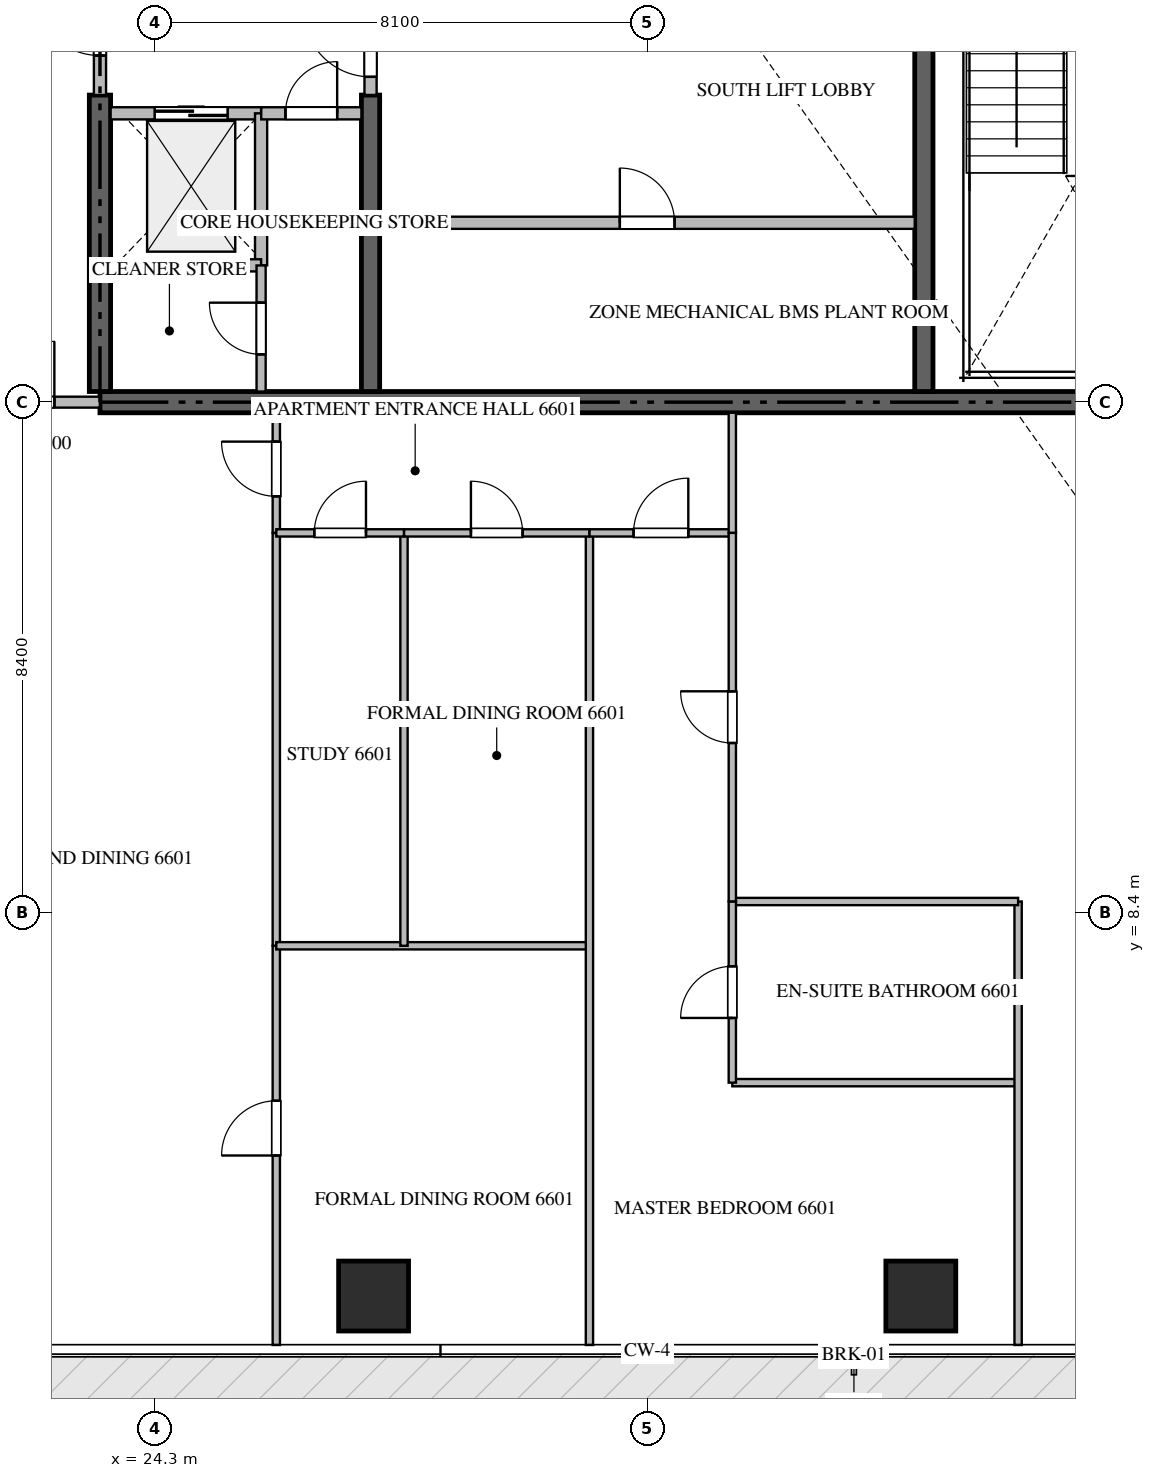
"""IFC4 building model, lengths in metres.
Left out: names, types, materials, properties, quantities, classifications, styles, units other than length and angle.
Written with IfcOpenShell. Run it as: python <this file> out.ifc"""

import sys

from ifc_helpers import new_model, si_unit, direction, frame, frame_2d, origin, origin_2d, place, context, subcontext, project, spatial, rectangle, extrude, source, transform, mapped, element, fill, save


model = new_model("IFC4")
c1 = context("Model", 3, precision=1e-05, world=origin(), true_north=direction((0.0, 1.0)))
c2 = subcontext(c1, "Body", "Model", "MODEL_VIEW")
j1 = project(units=[si_unit("LENGTHUNIT", "METRE"), si_unit("PLANEANGLEUNIT", "RADIAN")], contexts=[c1])
p1 = place(None, origin())
s1 = spatial("IfcSite", under=j1, at=p1, CompositionType="ELEMENT")
p2 = place(p1, origin())
s2 = spatial("IfcBuilding", under=s1, at=p2, CompositionType="ELEMENT")
p3 = place(p2, frame((0.0, 0.0, 264.35)))
s3 = spatial("IfcBuildingStorey", under=s2, at=p3, CompositionType="ELEMENT", Elevation=264.35)
p4 = place(p3, frame((23.4, 16.8, -0.26), z_axis=(0.0, 0.0, 1.0), x_axis=(1.0, 0.0, 0.0)))
e1 = element("IfcWall", 1, at=p4, inside=s3, PredefinedType="SHEAR", context=c2, shape_type="SweptSolid", body=[
    extrude(rectangle(XDim=18.0, YDim=0.35, at=frame_2d((9.0, 0.0))), origin(), (0.0, 0.0, 1.0), 3.848),
])
p5 = place(p3, frame((23.4, 16.975, -0.26), z_axis=(0.0, 0.0, 1.0), x_axis=(0.0, 1.0, 0.0)))
e2 = element("IfcWall", 2, at=p5, inside=s3, PredefinedType="SHEAR", context=c2, shape_type="SweptSolid", body=[
    extrude(rectangle(XDim=4.875, YDim=0.35, at=frame_2d((2.438, 0.0))), origin(), (0.0, 0.0, 1.0), 3.848),
])
p6 = place(p3, frame((27.85, 16.975, -0.26), z_axis=(0.0, 0.0, 1.0), x_axis=(0.0, 1.0, 0.0)))
e3 = element("IfcWall", 3, at=p6, inside=s3, PredefinedType="SHEAR", context=c2, shape_type="SweptSolid", body=[
    extrude(rectangle(XDim=4.875, YDim=0.3, at=frame_2d((2.438, 0.0))), origin(), (0.0, 0.0, 1.0), 3.848),
])
p7 = place(p3, frame((36.95, 16.975, -0.26), z_axis=(0.0, 0.0, 1.0), x_axis=(0.0, 1.0, 0.0)))
e4 = element("IfcWall", 4, at=p7, inside=s3, PredefinedType="SHEAR", context=c2, shape_type="SweptSolid", body=[
    extrude(rectangle(XDim=8.375, YDim=0.3, at=frame_2d((4.188, 0.0))), origin(), (0.0, 0.0, 1.0), 3.848),
])
m1 = source(origin(), c2, "Body", "SweptSolid", [
    extrude(rectangle(XDim=1.15, YDim=1.15, at=origin_2d()), origin(), (0.0, 0.0, 1.0), 3.85),
])
for number, where, z_axis, x_axis in (
    (5, (27.9, 2.1, -0.26), (0.0, 0.0, 1.0), (1.0, 0.0, 0.0)),
    (6, (36.9, 2.1, -0.26), (0.0, 0.0, 1.0), (1.0, 0.0, 0.0)),
):
    element("IfcColumn", number, at=place(p3, frame(where, z_axis=z_axis, x_axis=x_axis)), inside=s3, PredefinedType="COLUMN", context=c2, shape_type="MappedRepresentation", body=[
        mapped(m1, transform((0.0, 0.0, 0.0), scale=1.0)),
    ])
p8 = place(p3, frame((23.575, 21.55, 0.0), z_axis=(0.0, 0.0, 1.0), x_axis=(1.0, 0.0, 0.0)))
e7 = element("IfcWall", 7, at=p8, inside=s3, PredefinedType="STANDARD", context=c2, shape_type="SweptSolid", body=[
    extrude(rectangle(XDim=2.475, YDim=0.2, at=frame_2d((1.238, 0.0))), origin(), (0.0, 0.0, 1.0), 3.59),
])
p9 = place(p8, frame((0.725, 0.0, 0.0)))
e8 = element("IfcOpeningElement", 8, at=p9, cuts=e7, PredefinedType="OPENING", context=c2, shape_type="SweptSolid", body=[
    extrude(rectangle(XDim=1.2, YDim=2.2, at=frame_2d((0.6, 1.1))), frame((0.0, 0.11, 0.0), z_axis=(0.0, -1.0, 0.0), x_axis=(1.0, 0.0, 0.0)), (0.0, 0.0, 1.0), 0.22),
])
p10 = place(p3, frame((26.05, 19.05, 0.0), z_axis=(0.0, 0.0, 1.0), x_axis=(0.0, 1.0, 0.0)))
e9 = element("IfcWall", 9, at=p10, inside=s3, PredefinedType="STANDARD", context=c2, shape_type="SweptSolid", body=[
    extrude(rectangle(XDim=2.5, YDim=0.2, at=frame_2d((1.25, 0.0))), origin(), (0.0, 0.0, 1.0), 3.59),
])
p11 = place(p3, frame((23.575, 19.05, 0.0), z_axis=(0.0, 0.0, 1.0), x_axis=(1.0, 0.0, 0.0)))
e10 = element("IfcWall", 10, at=p11, inside=s3, PredefinedType="STANDARD", context=c2, shape_type="SweptSolid", body=[
    extrude(rectangle(XDim=2.475, YDim=0.2, at=frame_2d((1.238, 0.0))), origin(), (0.0, 0.0, 1.0), 3.59),
])
p12 = place(p3, frame((26.052, 21.55, 0.0), z_axis=(0.0, 0.0, 1.0), x_axis=(1.0, 0.0, 0.0)))
e11 = element("IfcWall", 11, at=p12, inside=s3, PredefinedType="STANDARD", context=c2, shape_type="SweptSolid", body=[
    extrude(rectangle(XDim=1.648, YDim=0.2, at=frame_2d((0.824, 0.0))), origin(), (0.0, 0.0, 1.0), 3.59),
])
p13 = place(p12, frame((0.399, 0.0, 0.0)))
e12 = element("IfcOpeningElement", 12, at=p13, cuts=e11, PredefinedType="OPENING", context=c2, shape_type="SweptSolid", body=[
    extrude(rectangle(XDim=0.85, YDim=2.1, at=frame_2d((0.425, 1.05))), frame((0.0, 0.11, 0.0), z_axis=(0.0, -1.0, 0.0), x_axis=(1.0, 0.0, 0.0)), (0.0, 0.0, 1.0), 0.22),
])
p14 = place(p3, frame((23.4, 21.852, 0.0), z_axis=(0.0, 0.0, 1.0), x_axis=(0.0, 1.0, 0.0)))
e13 = element("IfcWall", 13, at=p14, inside=s3, PredefinedType="STANDARD", context=c2, shape_type="SweptSolid", body=[
    extrude(rectangle(XDim=2.396, YDim=0.2, at=frame_2d((1.198, 0.0))), origin(), (0.0, 0.0, 1.0), 3.59),
])
p15 = place(p14, frame((0.648, 0.0, 0.0)))
e14 = element("IfcOpeningElement", 14, at=p15, cuts=e13, PredefinedType="OPENING", context=c2, shape_type="SweptSolid", body=[
    extrude(rectangle(XDim=1.1, YDim=2.15, at=frame_2d((0.55, 1.075))), frame((0.0, 0.11, 0.0), z_axis=(0.0, -1.0, 0.0), x_axis=(1.0, 0.0, 0.0)), (0.0, 0.0, 1.0), 0.22),
])
p16 = place(p3, frame((27.85, 21.852, 0.0), z_axis=(0.0, 0.0, 1.0), x_axis=(0.0, 1.0, 0.0)))
e15 = element("IfcWall", 15, at=p16, inside=s3, PredefinedType="STANDARD", context=c2, shape_type="SweptSolid", body=[
    extrude(rectangle(XDim=1.696, YDim=0.2, at=frame_2d((0.848, 0.0))), origin(), (0.0, 0.0, 1.0), 3.59),
])
p17 = place(p16, frame((0.298, 0.0, 0.0)))
e16 = element("IfcOpeningElement", 16, at=p17, cuts=e15, PredefinedType="OPENING", context=c2, shape_type="SweptSolid", body=[
    extrude(rectangle(XDim=1.1, YDim=2.15, at=frame_2d((0.55, 1.075))), frame((0.0, 0.11, 0.0), z_axis=(0.0, -1.0, 0.0), x_axis=(1.0, 0.0, 0.0)), (0.0, 0.0, 1.0), 0.22),
])
p18 = place(p3, frame((26.05, 16.975, 0.0), z_axis=(0.0, 0.0, 1.0), x_axis=(0.0, 1.0, 0.0)))
e17 = element("IfcWall", 17, at=p18, inside=s3, PredefinedType="PARTITIONING", context=c2, shape_type="SweptSolid", body=[
    extrude(rectangle(XDim=2.073, YDim=0.15, at=frame_2d((1.037, 0.0))), origin(), (0.0, 0.0, 1.0), 3.59),
])
p19 = place(p18, frame((0.611, 0.0, 0.0)))
e18 = element("IfcOpeningElement", 18, at=p19, cuts=e17, PredefinedType="OPENING", context=c2, shape_type="SweptSolid", body=[
    extrude(rectangle(XDim=0.85, YDim=2.1, at=frame_2d((0.425, 1.05))), frame((0.0, 0.085, 0.0), z_axis=(0.0, -1.0, 0.0), x_axis=(1.0, 0.0, 0.0)), (0.0, 0.0, 1.0), 0.17),
])
p20 = place(p3, frame((28.0, 19.75, 0.0), z_axis=(0.0, 0.0, 1.0), x_axis=(1.0, 0.0, 0.0)))
e19 = element("IfcWall", 19, at=p20, inside=s3, PredefinedType="STANDARD", context=c2, shape_type="SweptSolid", body=[
    extrude(rectangle(XDim=8.8, YDim=0.2, at=frame_2d((4.4, 0.0))), origin(), (0.0, 0.0, 1.0), 3.59),
])
p21 = place(p20, frame((3.95, 0.0, 0.0)))
e20 = element("IfcOpeningElement", 20, at=p21, cuts=e19, PredefinedType="OPENING", context=c2, shape_type="SweptSolid", body=[
    extrude(rectangle(XDim=0.9, YDim=2.1, at=frame_2d((0.45, 1.05))), frame((0.0, 0.11, 0.0), z_axis=(0.0, -1.0, 0.0), x_axis=(1.0, 0.0, 0.0)), (0.0, 0.0, 1.0), 0.22),
])
p22 = place(p3, frame((20.902, 16.8, 0.0), z_axis=(0.0, 0.0, 1.0), x_axis=(1.0, 0.0, 0.0)))
e21 = element("IfcWall", 21, at=p22, inside=s3, PredefinedType="PARTITIONING", context=c2, shape_type="SweptSolid", body=[
    extrude(rectangle(XDim=2.496, YDim=0.18, at=frame_2d((1.248, 0.0))), origin(), (0.0, 0.0, 1.0), 3.59),
])
p23 = place(p22, frame((0.748, 0.0, 0.0)))
e22 = element("IfcOpeningElement", 22, at=p23, cuts=e21, PredefinedType="OPENING", context=c2, shape_type="SweptSolid", body=[
    extrude(rectangle(XDim=1.0, YDim=2.15, at=frame_2d((0.5, 1.075))), frame((0.0, 0.1, 0.0), z_axis=(0.0, -1.0, 0.0), x_axis=(1.0, 0.0, 0.0)), (0.0, 0.0, 1.0), 0.2),
])
p24 = place(p3, frame((26.3, 14.65, 0.0), z_axis=(0.0, 0.0, 1.0), x_axis=(0.0, 1.0, 0.0)))
e23 = element("IfcWall", 23, at=p24, inside=s3, PredefinedType="PARTITIONING", context=c2, shape_type="SweptSolid", body=[
    extrude(rectangle(XDim=1.975, YDim=0.12, at=frame_2d((0.988, 0.0))), origin(), (0.0, 0.0, 1.0), 3.59),
])
p25 = place(p24, frame((0.601, 0.0, 0.0)))
e24 = element("IfcOpeningElement", 24, at=p25, cuts=e23, PredefinedType="OPENING", context=c2, shape_type="SweptSolid", body=[
    extrude(rectangle(XDim=0.9, YDim=2.1, at=frame_2d((0.45, 1.05))), frame((0.0, 0.07, 0.0), z_axis=(0.0, -1.0, 0.0), x_axis=(1.0, 0.0, 0.0)), (0.0, 0.0, 1.0), 0.14),
])
p26 = place(p3, frame((26.3, 1.295, 0.0), z_axis=(0.0, 0.0, 1.0), x_axis=(0.0, 1.0, 0.0)))
e25 = element("IfcWall", 25, at=p26, inside=s3, PredefinedType="PARTITIONING", context=c2, shape_type="SweptSolid", body=[
    extrude(rectangle(XDim=6.565, YDim=0.12, at=frame_2d((3.283, 0.0))), origin(), (0.0, 0.0, 1.0), 3.59),
])
p27 = place(p26, frame((3.116, 0.0, 0.0)))
e26 = element("IfcOpeningElement", 26, at=p27, cuts=e25, PredefinedType="OPENING", context=c2, shape_type="SweptSolid", body=[
    extrude(rectangle(XDim=0.9, YDim=2.1, at=frame_2d((0.45, 1.05))), frame((0.0, 0.07, 0.0), z_axis=(0.0, -1.0, 0.0), x_axis=(1.0, 0.0, 0.0)), (0.0, 0.0, 1.0), 0.14),
])
p28 = place(p3, frame((26.3, 7.862, 0.0), z_axis=(0.0, 0.0, 1.0), x_axis=(0.0, 1.0, 0.0)))
e27 = element("IfcWall", 27, at=p28, inside=s3, PredefinedType="PARTITIONING", context=c2, shape_type="SweptSolid", body=[
    extrude(rectangle(XDim=6.786, YDim=0.12, at=frame_2d((3.393, 0.0))), origin(), (0.0, 0.0, 1.0), 3.59),
])
p29 = place(p3, frame((26.3, 7.86, 0.0), z_axis=(0.0, 0.0, 1.0), x_axis=(1.0, 0.0, 0.0)))
e28 = element("IfcWall", 28, at=p29, inside=s3, PredefinedType="PARTITIONING", context=c2, shape_type="SweptSolid", body=[
    extrude(rectangle(XDim=5.15, YDim=0.12, at=frame_2d((2.575, 0.0))), origin(), (0.0, 0.0, 1.0), 3.59),
])
p30 = place(p3, frame((31.45, 1.295, 0.0), z_axis=(0.0, 0.0, 1.0), x_axis=(0.0, 1.0, 0.0)))
e29 = element("IfcWall", 29, at=p30, inside=s3, PredefinedType="PARTITIONING", context=c2, shape_type="SweptSolid", body=[
    extrude(rectangle(XDim=13.355, YDim=0.12, at=frame_2d((6.677, 0.0))), origin(), (0.0, 0.0, 1.0), 3.59),
])
p31 = place(p3, frame((28.4, 7.86, 0.0), z_axis=(0.0, 0.0, 1.0), x_axis=(0.0, 1.0, 0.0)))
e30 = element("IfcWall", 30, at=p31, inside=s3, PredefinedType="PARTITIONING", context=c2, shape_type="SweptSolid", body=[
    extrude(rectangle(XDim=6.79, YDim=0.12, at=frame_2d((3.395, 0.0))), origin(), (0.0, 0.0, 1.0), 3.59),
])
p32 = place(p3, frame((26.3, 14.65, 0.0), z_axis=(0.0, 0.0, 1.0), x_axis=(1.0, 0.0, 0.0)))
e31 = element("IfcWall", 31, at=p32, inside=s3, PredefinedType="PARTITIONING", context=c2, shape_type="SweptSolid", body=[
    extrude(rectangle(XDim=2.1, YDim=0.12, at=frame_2d((1.05, 0.0))), origin(), (0.0, 0.0, 1.0), 3.59),
])
p33 = place(p32, frame((0.625, 0.0, 0.0)))
e32 = element("IfcOpeningElement", 32, at=p33, cuts=e31, PredefinedType="OPENING", context=c2, shape_type="SweptSolid", body=[
    extrude(rectangle(XDim=0.85, YDim=2.1, at=frame_2d((0.425, 1.05))), frame((0.0, 0.07, 0.0), z_axis=(0.0, -1.0, 0.0), x_axis=(1.0, 0.0, 0.0)), (0.0, 0.0, 1.0), 0.14),
])
p34 = place(p3, frame((28.402, 14.65, 0.0), z_axis=(0.0, 0.0, 1.0), x_axis=(1.0, 0.0, 0.0)))
e33 = element("IfcWall", 33, at=p34, inside=s3, PredefinedType="PARTITIONING", context=c2, shape_type="SweptSolid", body=[
    extrude(rectangle(XDim=3.048, YDim=0.12, at=frame_2d((1.524, 0.0))), origin(), (0.0, 0.0, 1.0), 3.59),
])
p35 = place(p34, frame((1.099, 0.0, 0.0)))
e34 = element("IfcOpeningElement", 34, at=p35, cuts=e33, PredefinedType="OPENING", context=c2, shape_type="SweptSolid", body=[
    extrude(rectangle(XDim=0.85, YDim=2.1, at=frame_2d((0.425, 1.05))), frame((0.0, 0.07, 0.0), z_axis=(0.0, -1.0, 0.0), x_axis=(1.0, 0.0, 0.0)), (0.0, 0.0, 1.0), 0.14),
])
p36 = place(p3, frame((31.452, 14.65, 0.0), z_axis=(0.0, 0.0, 1.0), x_axis=(1.0, 0.0, 0.0)))
e35 = element("IfcWall", 35, at=p36, inside=s3, PredefinedType="PARTITIONING", context=c2, shape_type="SweptSolid", body=[
    extrude(rectangle(XDim=2.348, YDim=0.12, at=frame_2d((1.174, 0.0))), origin(), (0.0, 0.0, 1.0), 3.59),
])
p37 = place(p36, frame((0.724, 0.0, 0.0)))
e36 = element("IfcOpeningElement", 36, at=p37, cuts=e35, PredefinedType="OPENING", context=c2, shape_type="SweptSolid", body=[
    extrude(rectangle(XDim=0.9, YDim=2.1, at=frame_2d((0.45, 1.05))), frame((0.0, 0.07, 0.0), z_axis=(0.0, -1.0, 0.0), x_axis=(1.0, 0.0, 0.0)), (0.0, 0.0, 1.0), 0.14),
])
p38 = place(p3, frame((33.8, 5.609, 0.0), z_axis=(0.0, 0.0, 1.0), x_axis=(1.0, 0.0, 0.0)))
e37 = element("IfcWall", 37, at=p38, inside=s3, PredefinedType="PARTITIONING", context=c2, shape_type="SweptSolid", body=[
    extrude(rectangle(XDim=4.7, YDim=0.12, at=frame_2d((2.35, 0.0))), origin(), (0.0, 0.0, 1.0), 3.59),
])
p39 = place(p3, frame((38.5, 1.295, 0.0), z_axis=(0.0, 0.0, 1.0), x_axis=(0.0, 1.0, 0.0)))
e38 = element("IfcWall", 38, at=p39, inside=s3, PredefinedType="PARTITIONING", context=c2, shape_type="SweptSolid", body=[
    extrude(rectangle(XDim=7.293, YDim=0.12, at=frame_2d((3.646, 0.0))), origin(), (0.0, 0.0, 1.0), 3.59),
])
p40 = place(p3, frame((33.8, 8.588, 0.0), z_axis=(0.0, 0.0, 1.0), x_axis=(1.0, 0.0, 0.0)))
e39 = element("IfcWall", 39, at=p40, inside=s3, PredefinedType="PARTITIONING", context=c2, shape_type="SweptSolid", body=[
    extrude(rectangle(XDim=4.7, YDim=0.12, at=frame_2d((2.35, 0.0))), origin(), (0.0, 0.0, 1.0), 3.59),
])
p41 = place(p3, frame((33.8, 5.609, 0.0), z_axis=(0.0, 0.0, 1.0), x_axis=(0.0, 1.0, 0.0)))
e40 = element("IfcWall", 40, at=p41, inside=s3, PredefinedType="PARTITIONING", context=c2, shape_type="SweptSolid", body=[
    extrude(rectangle(XDim=2.979, YDim=0.12, at=frame_2d((1.49, 0.0))), origin(), (0.0, 0.0, 1.0), 3.59),
])
p42 = place(p41, frame((1.064, 0.0, 0.0)))
e41 = element("IfcOpeningElement", 41, at=p42, cuts=e40, PredefinedType="OPENING", context=c2, shape_type="SweptSolid", body=[
    extrude(rectangle(XDim=0.85, YDim=2.1, at=frame_2d((0.425, 1.05))), frame((0.0, 0.07, 0.0), z_axis=(0.0, -1.0, 0.0), x_axis=(1.0, 0.0, 0.0)), (0.0, 0.0, 1.0), 0.14),
])
p43 = place(p3, frame((33.8, 8.59, 0.0), z_axis=(0.0, 0.0, 1.0), x_axis=(0.0, 1.0, 0.0)))
e42 = element("IfcWall", 42, at=p43, inside=s3, PredefinedType="PARTITIONING", context=c2, shape_type="SweptSolid", body=[
    extrude(rectangle(XDim=6.06, YDim=0.12, at=frame_2d((3.03, 0.0))), origin(), (0.0, 0.0, 1.0), 3.59),
])
p44 = place(p43, frame((2.605, 0.0, 0.0)))
e43 = element("IfcOpeningElement", 43, at=p44, cuts=e42, PredefinedType="OPENING", context=c2, shape_type="SweptSolid", body=[
    extrude(rectangle(XDim=0.85, YDim=2.1, at=frame_2d((0.425, 1.05))), frame((0.0, 0.07, 0.0), z_axis=(0.0, -1.0, 0.0), x_axis=(1.0, 0.0, 0.0)), (0.0, 0.0, 1.0), 0.14),
])
p45 = place(p3, frame((33.8, 14.652, 0.0), z_axis=(0.0, 0.0, 1.0), x_axis=(0.0, 1.0, 0.0)))
e44 = element("IfcWall", 44, at=p45, inside=s3, PredefinedType="PARTITIONING", context=c2, shape_type="SweptSolid", body=[
    extrude(rectangle(XDim=1.973, YDim=0.12, at=frame_2d((0.986, 0.0))), origin(), (0.0, 0.0, 1.0), 3.59),
])
m2 = source(origin(), c2, "Body", "SweptSolid", [
    extrude(rectangle(XDim=1.2, YDim=2.2, at=frame_2d((0.6, 1.1))), frame((0.0, 0.025, 0.0), z_axis=(0.0, -1.0, 0.0), x_axis=(1.0, 0.0, 0.0)), (0.0, 0.0, 1.0), 0.05),
])
p46 = place(p9, origin())
e45 = element("IfcDoor", 45, at=p46, inside=s3, OperationType="DOUBLE_DOOR_SLIDING", PredefinedType="DOOR", context=c2, shape_type="MappedRepresentation", body=[
    mapped(m2, transform((0.0, 0.0, 0.0), scale=1.0)),
])
fill(e8, e45)
m3 = source(origin(), c2, "Body", "SweptSolid", [
    extrude(rectangle(XDim=0.85, YDim=2.1, at=frame_2d((0.425, 1.05))), frame((0.0, 0.025, 0.0), z_axis=(0.0, -1.0, 0.0), x_axis=(1.0, 0.0, 0.0)), (0.0, 0.0, 1.0), 0.05),
])
p47 = place(p13, origin())
e46 = element("IfcDoor", 46, at=p47, inside=s3, OperationType="SINGLE_SWING_RIGHT", PredefinedType="DOOR", context=c2, shape_type="MappedRepresentation", body=[
    mapped(m3, transform((0.0, 0.0, 0.0), scale=1.0)),
])
fill(e12, e46)
m4 = source(origin(), c2, "Body", "SweptSolid", [
    extrude(rectangle(XDim=1.1, YDim=2.15, at=frame_2d((0.55, 1.075))), frame((0.0, 0.025, 0.0), z_axis=(0.0, -1.0, 0.0), x_axis=(1.0, 0.0, 0.0)), (0.0, 0.0, 1.0), 0.05),
])
p48 = place(p15, origin())
e47 = element("IfcDoor", 47, at=p48, inside=s3, OperationType="SINGLE_SWING_RIGHT", PredefinedType="DOOR", context=c2, shape_type="MappedRepresentation", body=[
    mapped(m4, transform((0.0, 0.0, 0.0), scale=1.0)),
])
fill(e14, e47)
p49 = place(p17, origin())
e48 = element("IfcDoor", 48, at=p49, inside=s3, OperationType="SINGLE_SWING_RIGHT", PredefinedType="DOOR", context=c2, shape_type="MappedRepresentation", body=[
    mapped(m4, transform((0.0, 0.0, 0.0), scale=1.0)),
])
fill(e16, e48)
p50 = place(p19, origin())
e49 = element("IfcDoor", 49, at=p50, inside=s3, OperationType="SINGLE_SWING_RIGHT", PredefinedType="DOOR", context=c2, shape_type="MappedRepresentation", body=[
    mapped(m3, transform((0.0, 0.0, 0.0), scale=1.0)),
])
fill(e18, e49)
m5 = source(origin(), c2, "Body", "SweptSolid", [
    extrude(rectangle(XDim=0.9, YDim=2.1, at=frame_2d((0.45, 1.05))), frame((0.0, 0.025, 0.0), z_axis=(0.0, -1.0, 0.0), x_axis=(1.0, 0.0, 0.0)), (0.0, 0.0, 1.0), 0.05),
])
p51 = place(p21, origin())
e50 = element("IfcDoor", 50, at=p51, inside=s3, OperationType="SINGLE_SWING_LEFT", PredefinedType="DOOR", context=c2, shape_type="MappedRepresentation", body=[
    mapped(m5, transform((0.0, 0.0, 0.0), scale=1.0)),
])
fill(e20, e50)
m6 = source(origin(), c2, "Body", "SweptSolid", [
    extrude(rectangle(XDim=1.0, YDim=2.15, at=frame_2d((0.5, 1.075))), frame((0.0, 0.025, 0.0), z_axis=(0.0, -1.0, 0.0), x_axis=(1.0, 0.0, 0.0)), (0.0, 0.0, 1.0), 0.05),
])
p52 = place(p23, origin())
e51 = element("IfcDoor", 51, at=p52, inside=s3, OperationType="SINGLE_SWING_RIGHT", PredefinedType="DOOR", context=c2, shape_type="MappedRepresentation", body=[
    mapped(m6, transform((0.0, 0.0, 0.0), scale=1.0)),
])
fill(e22, e51)
p53 = place(p25, origin())
e52 = element("IfcDoor", 52, at=p53, inside=s3, OperationType="SINGLE_SWING_RIGHT", PredefinedType="DOOR", context=c2, shape_type="MappedRepresentation", body=[
    mapped(m5, transform((0.0, 0.0, 0.0), scale=1.0)),
])
fill(e24, e52)
p54 = place(p27, origin())
e53 = element("IfcDoor", 53, at=p54, inside=s3, OperationType="SINGLE_SWING_LEFT", PredefinedType="DOOR", context=c2, shape_type="MappedRepresentation", body=[
    mapped(m5, transform((0.0, 0.0, 0.0), scale=1.0)),
])
fill(e26, e53)
p55 = place(p33, origin())
e54 = element("IfcDoor", 54, at=p55, inside=s3, OperationType="SINGLE_SWING_RIGHT", PredefinedType="DOOR", context=c2, shape_type="MappedRepresentation", body=[
    mapped(m3, transform((0.0, 0.0, 0.0), scale=1.0)),
])
fill(e32, e54)
p56 = place(p35, origin())
e55 = element("IfcDoor", 55, at=p56, inside=s3, OperationType="SINGLE_SWING_LEFT", PredefinedType="DOOR", context=c2, shape_type="MappedRepresentation", body=[
    mapped(m3, transform((0.0, 0.0, 0.0), scale=1.0)),
])
fill(e34, e55)
p57 = place(p37, origin())
e56 = element("IfcDoor", 56, at=p57, inside=s3, OperationType="SINGLE_SWING_RIGHT", PredefinedType="DOOR", context=c2, shape_type="MappedRepresentation", body=[
    mapped(m5, transform((0.0, 0.0, 0.0), scale=1.0)),
])
fill(e36, e56)
p58 = place(p42, origin())
e57 = element("IfcDoor", 57, at=p58, inside=s3, OperationType="SINGLE_SWING_LEFT", PredefinedType="DOOR", context=c2, shape_type="MappedRepresentation", body=[
    mapped(m3, transform((0.0, 0.0, 0.0), scale=1.0)),
])
fill(e41, e57)
p59 = place(p44, origin())
e58 = element("IfcDoor", 58, at=p59, inside=s3, OperationType="SINGLE_SWING_RIGHT", PredefinedType="DOOR", context=c2, shape_type="MappedRepresentation", body=[
    mapped(m3, transform((0.0, 0.0, 0.0), scale=1.0)),
])
fill(e43, e58)
save(model, sys.argv[1])
